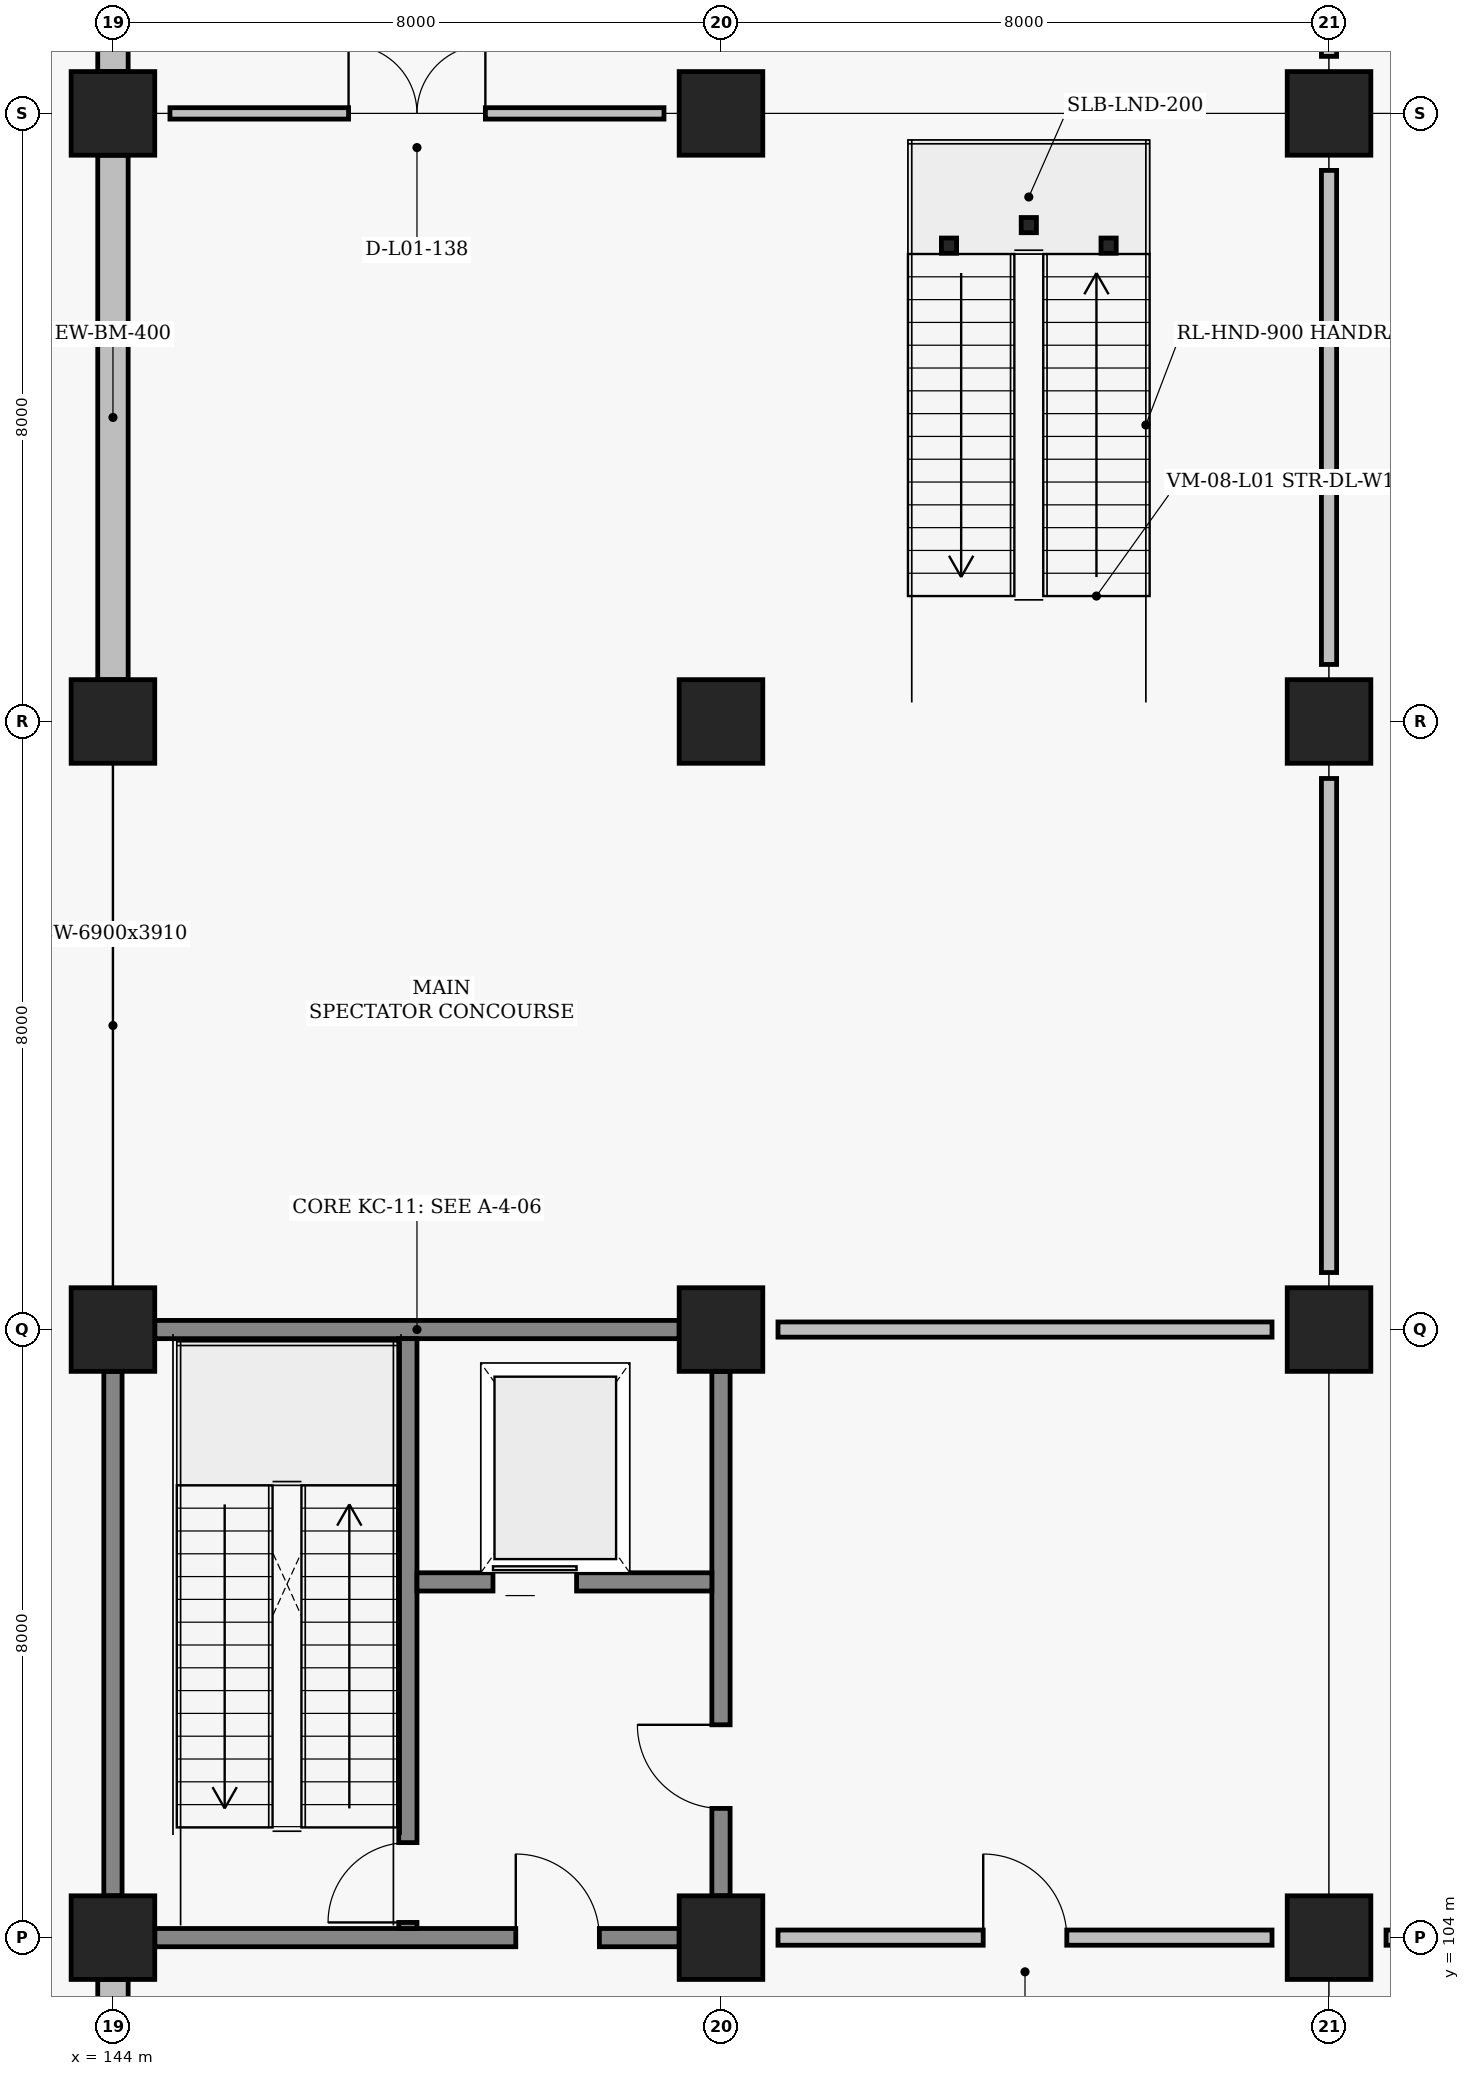
"""IFC4 building model, lengths in metres.
Left out: names, types, materials, properties, quantities, classifications, styles, units other than length and angle.
Written with IfcOpenShell. Run it as: python <this file> out.ifc"""

import sys

from ifc_helpers import new_model, si_unit, direction, frame, frame_2d, origin, origin_2d, place, context, subcontext, project, spatial, rectangle, hollow_rectangle, extrude, element, fill, save


model = new_model("IFC4")
c1 = context("Model", 3, precision=1e-05, world=origin(), true_north=direction((0.0, 1.0)))
c2 = subcontext(c1, "Body", "Model", "MODEL_VIEW")
j1 = project(units=[si_unit("LENGTHUNIT", "METRE"), si_unit("PLANEANGLEUNIT", "RADIAN")], contexts=[c1])
p1 = place(None, origin())
s1 = spatial("IfcSite", under=j1, at=p1, CompositionType="ELEMENT")
p2 = place(p1, origin())
s2 = spatial("IfcBuilding", under=s1, at=p2, CompositionType="ELEMENT")
p3 = place(p2, origin())
s3 = spatial("IfcBuildingStorey", under=s2, at=p3, CompositionType="ELEMENT", Elevation=0.0)
for number, where, z_axis, x_axis in (
    (1, (144.0, 104.0, 0.0), (0.0, 0.0, 1.0), (1.0, 0.0, 0.0)),
    (2, (144.0, 112.0, 0.0), (0.0, 0.0, 1.0), (1.0, 0.0, 0.0)),
    (3, (144.0, 120.0, 0.0), (0.0, 0.0, 1.0), (1.0, 0.0, 0.0)),
    (4, (144.0, 128.0, 0.0), (0.0, 0.0, 1.0), (1.0, 0.0, 0.0)),
    (5, (152.0, 104.0, 0.0), (0.0, 0.0, 1.0), (1.0, 0.0, 0.0)),
    (6, (152.0, 112.0, 0.0), (0.0, 0.0, 1.0), (1.0, 0.0, 0.0)),
    (7, (152.0, 120.0, 0.0), (0.0, 0.0, 1.0), (1.0, 0.0, 0.0)),
    (8, (152.0, 128.0, 0.0), (0.0, 0.0, 1.0), (1.0, 0.0, 0.0)),
    (9, (160.0, 104.0, 0.0), (0.0, 0.0, 1.0), (1.0, 0.0, 0.0)),
    (10, (160.0, 112.0, 0.0), (0.0, 0.0, 1.0), (1.0, 0.0, 0.0)),
    (11, (160.0, 120.0, 0.0), (0.0, 0.0, 1.0), (1.0, 0.0, 0.0)),
    (12, (160.0, 128.0, 0.0), (0.0, 0.0, 1.0), (1.0, 0.0, 0.0)),
):
    element("IfcColumn", number, at=place(p3, frame(where, z_axis=z_axis, x_axis=x_axis)), inside=s3, PredefinedType="COLUMN", context=c2, shape_type="SweptSolid", body=[
        extrude(rectangle(XDim=1.1, YDim=1.1, at=origin_2d()), origin(), (0.0, 0.0, 1.0), 4.8),
    ])
p4 = place(p3, frame((144.0, 96.55, 0.0), z_axis=(0.0, 0.0, 1.0), x_axis=(0.0, 1.0, 0.0)))
e13 = element("IfcWall", 13, at=p4, inside=s3, PredefinedType="SOLIDWALL", context=c2, shape_type="SweptSolid", body=[
    extrude(rectangle(XDim=6.9, YDim=0.4, at=frame_2d((3.45, 0.0))), origin(), (0.0, 0.0, 1.0), 3.66),
])
p5 = place(p4, frame((1.875, 0.0, 0.95)))
e14 = element("IfcOpeningElement", 14, at=p5, cuts=e13, PredefinedType="OPENING", context=c2, shape_type="SweptSolid", body=[
    extrude(rectangle(XDim=3.15, YDim=2.15, at=frame_2d((1.575, 1.075))), frame((0.0, 0.21, 0.0), z_axis=(0.0, -1.0, 0.0), x_axis=(1.0, 0.0, 0.0)), (0.0, 0.0, 1.0), 0.42),
])
p6 = place(p3, frame((144.0, 120.55, 0.0), z_axis=(0.0, 0.0, 1.0), x_axis=(0.0, 1.0, 0.0)))
e15 = element("IfcWall", 15, at=p6, inside=s3, PredefinedType="SOLIDWALL", context=c2, shape_type="SweptSolid", body=[
    extrude(rectangle(XDim=6.9, YDim=0.4, at=frame_2d((3.45, 0.0))), origin(), (0.0, 0.0, 1.0), 3.91),
])
p7 = place(p3, frame((144.0, 128.55, 0.0), z_axis=(0.0, 0.0, 1.0), x_axis=(0.0, 1.0, 0.0)))
e16 = element("IfcWall", 16, at=p7, inside=s3, PredefinedType="SOLIDWALL", context=c2, shape_type="SweptSolid", body=[
    extrude(rectangle(XDim=6.9, YDim=0.4, at=frame_2d((3.45, 0.0))), origin(), (0.0, 0.0, 1.0), 3.66),
])
p8 = place(p7, frame((1.8, 0.0, 0.95)))
e17 = element("IfcOpeningElement", 17, at=p8, cuts=e16, PredefinedType="OPENING", context=c2, shape_type="SweptSolid", body=[
    extrude(rectangle(XDim=3.3, YDim=2.2, at=frame_2d((1.65, 1.1))), frame((0.0, 0.21, 0.0), z_axis=(0.0, -1.0, 0.0), x_axis=(1.0, 0.0, 0.0)), (0.0, 0.0, 1.0), 0.42),
])
p9 = place(p3, frame((144.55, 104.0, 0.0), z_axis=(0.0, 0.0, 1.0), x_axis=(1.0, 0.0, 0.0)))
e18 = element("IfcWall", 18, at=p9, inside=s3, PredefinedType="SHEAR", context=c2, shape_type="SweptSolid", body=[
    extrude(rectangle(XDim=6.9, YDim=0.24, at=frame_2d((3.45, 0.0))), origin(), (0.0, 0.0, 1.0), 3.81),
])
p10 = place(p9, frame((4.75, 0.0, 0.0)))
e19 = element("IfcOpeningElement", 19, at=p10, cuts=e18, PredefinedType="OPENING", context=c2, shape_type="SweptSolid", body=[
    extrude(rectangle(XDim=1.1, YDim=2.2, at=frame_2d((0.55, 1.1))), frame((0.0, 0.13, 0.0), z_axis=(0.0, -1.0, 0.0), x_axis=(1.0, 0.0, 0.0)), (0.0, 0.0, 1.0), 0.26),
])
p11 = place(p3, frame((144.55, 112.0, 0.0), z_axis=(0.0, 0.0, 1.0), x_axis=(1.0, 0.0, 0.0)))
e20 = element("IfcWall", 20, at=p11, inside=s3, PredefinedType="SHEAR", context=c2, shape_type="SweptSolid", body=[
    extrude(rectangle(XDim=6.9, YDim=0.24, at=frame_2d((3.45, 0.0))), origin(), (0.0, 0.0, 1.0), 3.81),
])
p12 = place(p3, frame((144.0, 104.55, 0.0), z_axis=(0.0, 0.0, 1.0), x_axis=(0.0, 1.0, 0.0)))
e21 = element("IfcWall", 21, at=p12, inside=s3, PredefinedType="SHEAR", context=c2, shape_type="SweptSolid", body=[
    extrude(rectangle(XDim=6.9, YDim=0.24, at=frame_2d((3.45, 0.0))), origin(), (0.0, 0.0, 1.0), 3.91),
])
p13 = place(p3, frame((152.0, 104.55, 0.0), z_axis=(0.0, 0.0, 1.0), x_axis=(0.0, 1.0, 0.0)))
e22 = element("IfcWall", 22, at=p13, inside=s3, PredefinedType="SHEAR", context=c2, shape_type="SweptSolid", body=[
    extrude(rectangle(XDim=6.9, YDim=0.24, at=frame_2d((3.45, 0.0))), origin(), (0.0, 0.0, 1.0), 3.81),
])
p14 = place(p13, frame((1.15, 0.0, 0.0)))
e23 = element("IfcOpeningElement", 23, at=p14, cuts=e22, PredefinedType="OPENING", context=c2, shape_type="SweptSolid", body=[
    extrude(rectangle(XDim=1.1, YDim=2.2, at=frame_2d((0.55, 1.1))), frame((0.0, 0.13, 0.0), z_axis=(0.0, -1.0, 0.0), x_axis=(1.0, 0.0, 0.0)), (0.0, 0.0, 1.0), 0.26),
])
p15 = place(p3, frame((147.88, 104.12, 0.0), z_axis=(0.0, 0.0, 1.0), x_axis=(0.0, 1.0, 0.0)))
e24 = element("IfcWall", 24, at=p15, inside=s3, PredefinedType="SHEAR", context=c2, shape_type="SweptSolid", body=[
    extrude(rectangle(XDim=7.76, YDim=0.24, at=frame_2d((3.88, 0.0))), origin(), (0.0, 0.0, 1.0), 4.01),
])
p16 = place(p15, frame((0.08, 0.0, 0.0)))
e25 = element("IfcOpeningElement", 25, at=p16, cuts=e24, PredefinedType="OPENING", context=c2, shape_type="SweptSolid", body=[
    extrude(rectangle(XDim=1.05, YDim=2.15, at=frame_2d((0.525, 1.075))), frame((0.0, 0.13, 0.0), z_axis=(0.0, -1.0, 0.0), x_axis=(1.0, 0.0, 0.0)), (0.0, 0.0, 1.0), 0.26),
])
p17 = place(p3, frame((148.0, 108.68, 0.0), z_axis=(0.0, 0.0, 1.0), x_axis=(1.0, 0.0, 0.0)))
e26 = element("IfcWall", 26, at=p17, inside=s3, PredefinedType="SHEAR", context=c2, shape_type="SweptSolid", body=[
    extrude(rectangle(XDim=3.88, YDim=0.24, at=frame_2d((1.94, 0.0))), origin(), (0.0, 0.0, 1.0), 3.81),
])
p18 = place(p17, frame((1.0, 0.0, 0.0)))
e27 = element("IfcOpeningElement", 27, at=p18, cuts=e26, PredefinedType="OPENING", context=c2, shape_type="SweptSolid", body=[
    extrude(rectangle(XDim=1.1, YDim=2.15, at=frame_2d((0.55, 1.075))), frame((0.0, 0.13, 0.0), z_axis=(0.0, -1.0, 0.0), x_axis=(1.0, 0.0, 0.0)), (0.0, 0.0, 1.0), 0.26),
])
for number, where, z_axis, x_axis in (
    (28, (155.0, 126.26, 0.0), (0.0, 0.0, 1.0), (1.0, 0.0, 0.0)),
    (29, (157.1, 126.26, 0.0), (0.0, 0.0, 1.0), (1.0, 0.0, 0.0)),
    (30, (156.05, 126.53, 0.0), (0.0, 0.0, 1.0), (1.0, 0.0, 0.0)),
):
    element("IfcColumn", number, at=place(p3, frame(where, z_axis=z_axis, x_axis=x_axis)), inside=s3, PredefinedType="COLUMN", context=c2, shape_type="SweptSolid", body=[
        extrude(hollow_rectangle(XDim=0.2, YDim=0.2, WallThickness=0.009, at=origin_2d()), origin(), (0.0, 0.0, 1.0), 2.2),
    ])
p19 = place(p3, frame((160.0, 128.75, 0.0), z_axis=(0.0, 0.0, 1.0), x_axis=(0.0, 1.0, 0.0)))
e31 = element("IfcWall", 31, at=p19, inside=s3, PredefinedType="PARTITIONING", context=c2, shape_type="SweptSolid", body=[
    extrude(rectangle(XDim=6.5, YDim=0.2, at=frame_2d((3.25, 0.0))), origin(), (0.0, 0.0, 1.0), 3.81),
])
p20 = place(p3, frame((152.75, 104.0, 0.0), z_axis=(0.0, 0.0, 1.0), x_axis=(1.0, 0.0, 0.0)))
e32 = element("IfcWall", 32, at=p20, inside=s3, PredefinedType="PARTITIONING", context=c2, shape_type="SweptSolid", body=[
    extrude(rectangle(XDim=6.5, YDim=0.2, at=frame_2d((3.25, 0.0))), origin(), (0.0, 0.0, 1.0), 3.91),
])
p21 = place(p20, frame((2.7, 0.0, 0.0)))
e33 = element("IfcOpeningElement", 33, at=p21, cuts=e32, PredefinedType="OPENING", context=c2, shape_type="SweptSolid", body=[
    extrude(rectangle(XDim=1.1, YDim=2.2, at=frame_2d((0.55, 1.1))), frame((0.0, 0.11, 0.0), z_axis=(0.0, -1.0, 0.0), x_axis=(1.0, 0.0, 0.0)), (0.0, 0.0, 1.0), 0.22),
])
for number, where, z_axis, x_axis in (
    (34, (152.75, 112.0, 0.0), (0.0, 0.0, 1.0), (1.0, 0.0, 0.0)),
    (35, (160.75, 104.0, 0.0), (0.0, 0.0, 1.0), (1.0, 0.0, 0.0)),
):
    element("IfcWall", number, at=place(p3, frame(where, z_axis=z_axis, x_axis=x_axis)), inside=s3, PredefinedType="PARTITIONING", context=c2, shape_type="SweptSolid", body=[
        extrude(rectangle(XDim=6.5, YDim=0.2, at=frame_2d((3.25, 0.0))), origin(), (0.0, 0.0, 1.0), 3.91),
    ])
for number, where, z_axis, x_axis in (
    (36, (160.0, 112.75, 0.0), (0.0, 0.0, 1.0), (0.0, 1.0, 0.0)),
    (37, (160.0, 120.75, 0.0), (0.0, 0.0, 1.0), (0.0, 1.0, 0.0)),
):
    element("IfcWall", number, at=place(p3, frame(where, z_axis=z_axis, x_axis=x_axis)), inside=s3, PredefinedType="PARTITIONING", context=c2, shape_type="SweptSolid", body=[
        extrude(rectangle(XDim=6.5, YDim=0.2, at=frame_2d((3.25, 0.0))), origin(), (0.0, 0.0, 1.0), 3.81),
    ])
p22 = place(p3, frame((144.75, 128.0, 0.0), z_axis=(0.0, 0.0, 1.0), x_axis=(1.0, 0.0, 0.0)))
e38 = element("IfcWall", 38, at=p22, inside=s3, PredefinedType="PARTITIONING", context=c2, shape_type="SweptSolid", body=[
    extrude(rectangle(XDim=6.5, YDim=0.15, at=frame_2d((3.25, 0.0))), origin(), (0.0, 0.0, 1.0), 3.91),
])
p23 = place(p22, frame((2.35, 0.0, 0.0)))
e39 = element("IfcOpeningElement", 39, at=p23, cuts=e38, PredefinedType="OPENING", context=c2, shape_type="SweptSolid", body=[
    extrude(rectangle(XDim=1.8, YDim=2.3, at=frame_2d((0.9, 1.15))), frame((0.0, 0.085, 0.0), z_axis=(0.0, -1.0, 0.0), x_axis=(1.0, 0.0, 0.0)), (0.0, 0.0, 1.0), 0.17),
])
p24 = place(p10, origin())
e40 = element("IfcDoor", 40, at=p24, inside=s3, OperationType="SINGLE_SWING_LEFT", PredefinedType="DOOR", context=c2, shape_type="SweptSolid", body=[
    extrude(rectangle(XDim=1.1, YDim=2.2, at=frame_2d((0.55, 1.1))), frame((0.0, 0.025, 0.0), z_axis=(0.0, -1.0, 0.0), x_axis=(1.0, 0.0, 0.0)), (0.0, 0.0, 1.0), 0.05),
])
fill(e19, e40)
p25 = place(p14, origin())
e41 = element("IfcDoor", 41, at=p25, inside=s3, OperationType="SINGLE_SWING_RIGHT", PredefinedType="DOOR", context=c2, shape_type="SweptSolid", body=[
    extrude(rectangle(XDim=1.1, YDim=2.2, at=frame_2d((0.55, 1.1))), frame((0.0, 0.025, 0.0), z_axis=(0.0, -1.0, 0.0), x_axis=(1.0, 0.0, 0.0)), (0.0, 0.0, 1.0), 0.05),
])
fill(e23, e41)
p26 = place(p16, origin())
e42 = element("IfcDoor", 42, at=p26, inside=s3, OperationType="SINGLE_SWING_LEFT", PredefinedType="DOOR", context=c2, shape_type="SweptSolid", body=[
    extrude(rectangle(XDim=1.05, YDim=2.15, at=frame_2d((0.525, 1.075))), frame((0.0, 0.025, 0.0), z_axis=(0.0, -1.0, 0.0), x_axis=(1.0, 0.0, 0.0)), (0.0, 0.0, 1.0), 0.05),
])
fill(e25, e42)
p27 = place(p18, origin())
e43 = element("IfcDoor", 43, at=p27, inside=s3, OperationType="SLIDING_TO_LEFT", PredefinedType="DOOR", context=c2, shape_type="SweptSolid", body=[
    extrude(rectangle(XDim=1.1, YDim=2.15, at=frame_2d((0.55, 1.075))), frame((0.0, 0.025, 0.0), z_axis=(0.0, -1.0, 0.0), x_axis=(1.0, 0.0, 0.0)), (0.0, 0.0, 1.0), 0.05),
])
fill(e27, e43)
p28 = place(p21, origin())
e44 = element("IfcDoor", 44, at=p28, inside=s3, OperationType="SINGLE_SWING_LEFT", PredefinedType="DOOR", context=c2, shape_type="SweptSolid", body=[
    extrude(rectangle(XDim=1.1, YDim=2.2, at=frame_2d((0.55, 1.1))), frame((0.0, 0.025, 0.0), z_axis=(0.0, -1.0, 0.0), x_axis=(1.0, 0.0, 0.0)), (0.0, 0.0, 1.0), 0.05),
])
fill(e33, e44)
p29 = place(p23, origin())
e45 = element("IfcDoor", 45, at=p29, inside=s3, OperationType="DOUBLE_SWING_LEFT", PredefinedType="DOOR", context=c2, shape_type="SweptSolid", body=[
    extrude(rectangle(XDim=1.8, YDim=2.3, at=frame_2d((0.9, 1.15))), frame((0.0, 0.025, 0.0), z_axis=(0.0, -1.0, 0.0), x_axis=(1.0, 0.0, 0.0)), (0.0, 0.0, 1.0), 0.05),
])
fill(e39, e45)
save(model, sys.argv[1])
